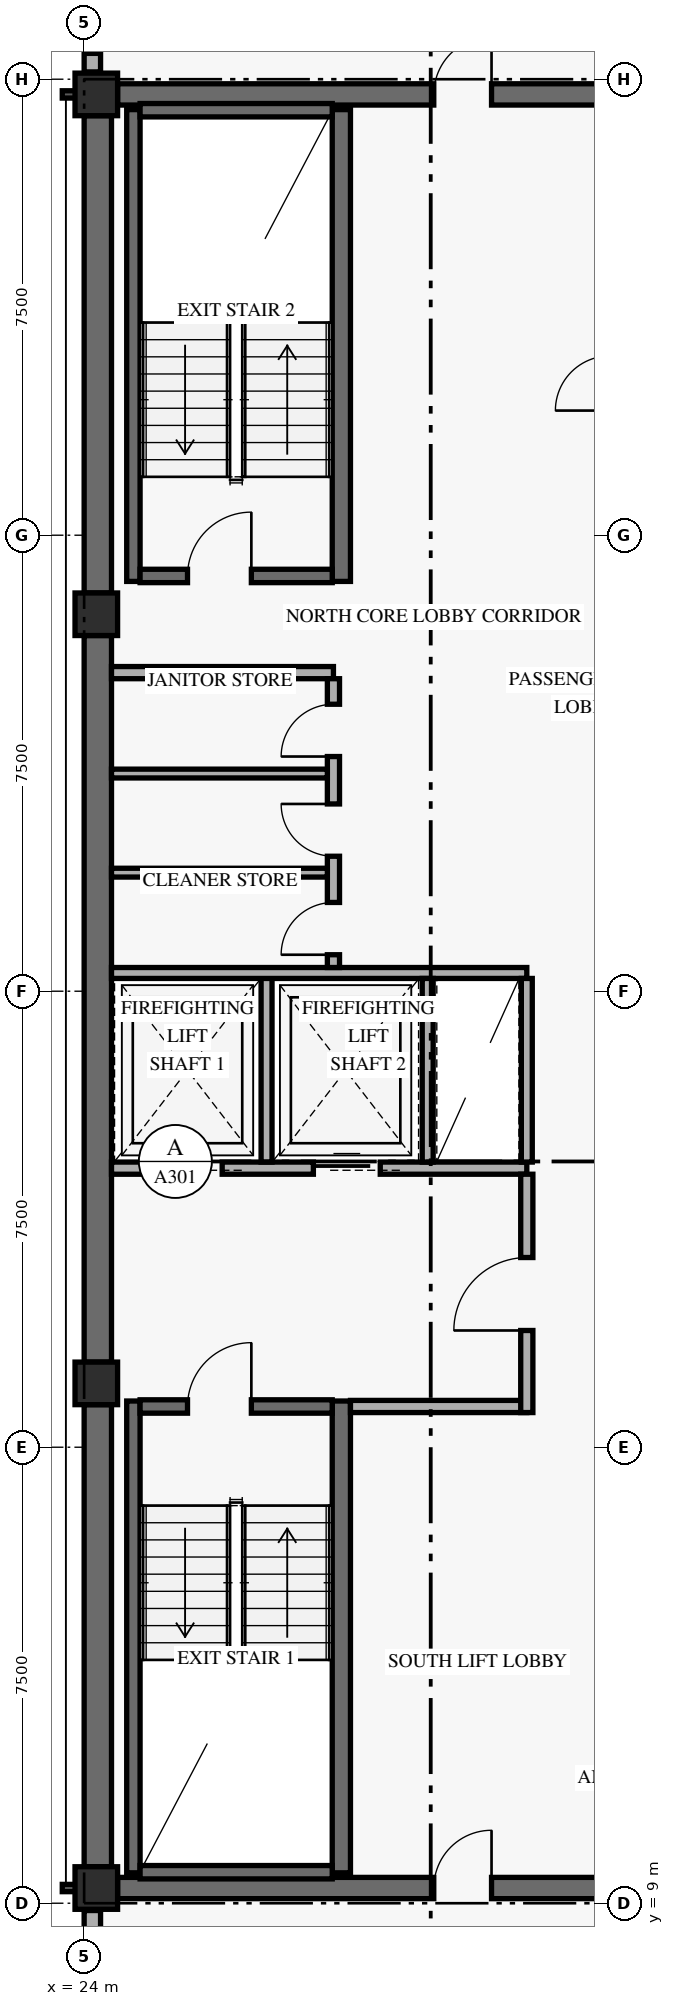
"""IFC4 building model, lengths in metres.
Left out: names, types, materials, properties, quantities, classifications, styles, units other than length and angle.
Written with IfcOpenShell. Run it as: python <this file> out.ifc"""

import sys

from ifc_helpers import new_model, si_unit, direction, frame, frame_2d, origin, origin_2d, place, context, subcontext, project, spatial, rectangle, extrude, element, fill, save


model = new_model("IFC4")
c1 = context("Model", 3, precision=1e-05, world=origin(), true_north=direction((0.0, 1.0)))
c2 = subcontext(c1, "Body", "Model", "MODEL_VIEW")
j1 = project(units=[si_unit("LENGTHUNIT", "METRE"), si_unit("PLANEANGLEUNIT", "RADIAN")], contexts=[c1])
p1 = place(None, origin())
s1 = spatial("IfcSite", under=j1, at=p1, CompositionType="ELEMENT")
p2 = place(p1, origin())
s2 = spatial("IfcBuilding", under=s1, at=p2, CompositionType="ELEMENT")
p3 = place(p2, frame((0.0, 0.0, 235.2)))
s3 = spatial("IfcBuildingStorey", under=s2, at=p3, CompositionType="ELEMENT", Elevation=235.2)
p4 = place(p3, frame((24.225, 9.6, 0.0), z_axis=(0.0, 0.0, 1.0), x_axis=(0.0, 1.0, 0.0)))
e1 = element("IfcWall", 1, at=p4, inside=s3, PredefinedType="SHEAR", context=c2, shape_type="SweptSolid", body=[
    extrude(rectangle(XDim=7.6, YDim=0.45, at=frame_2d((3.8, 0.0))), origin(), (0.0, 0.0, 1.0), 2.821),
])
p5 = place(p3, frame((24.225, 17.9, 0.0), z_axis=(0.0, 0.0, 1.0), x_axis=(0.0, 1.0, 0.0)))
e2 = element("IfcWall", 2, at=p5, inside=s3, PredefinedType="SHEAR", context=c2, shape_type="SweptSolid", body=[
    extrude(rectangle(XDim=11.95, YDim=0.45, at=frame_2d((5.975, 0.0))), origin(), (0.0, 0.0, 1.0), 2.821),
])
p6 = place(p3, frame((24.225, 30.55, 0.0), z_axis=(0.0, 0.0, 1.0), x_axis=(0.0, 1.0, 0.0)))
e3 = element("IfcWall", 3, at=p6, inside=s3, PredefinedType="SHEAR", context=c2, shape_type="SweptSolid", body=[
    extrude(rectangle(XDim=7.85, YDim=0.45, at=frame_2d((3.925, 0.0))), origin(), (0.0, 0.0, 1.0), 2.821),
])
p7 = place(p3, frame((24.55, 9.25, 0.0), z_axis=(0.0, 0.0, 1.0), x_axis=(1.0, 0.0, 0.0)))
e4 = element("IfcWall", 4, at=p7, inside=s3, PredefinedType="SHEAR", context=c2, shape_type="SweptSolid", body=[
    extrude(rectangle(XDim=10.3, YDim=0.35, at=frame_2d((5.15, 0.0))), origin(), (0.0, 0.0, 1.0), 3.36),
])
p8 = place(p7, frame((5.2, 0.0, 0.0)))
e5 = element("IfcOpeningElement", 5, at=p8, cuts=e4, PredefinedType="OPENING", context=c2, shape_type="SweptSolid", body=[
    extrude(rectangle(XDim=0.95, YDim=2.15, at=frame_2d((0.475, 1.075))), frame((0.0, 0.185, 0.0), z_axis=(0.0, -1.0, 0.0), x_axis=(1.0, 0.0, 0.0)), (0.0, 0.0, 1.0), 0.37),
])
p9 = place(p3, frame((24.55, 38.75, 0.0), z_axis=(0.0, 0.0, 1.0), x_axis=(1.0, 0.0, 0.0)))
e6 = element("IfcWall", 6, at=p9, inside=s3, PredefinedType="SHEAR", context=c2, shape_type="SweptSolid", body=[
    extrude(rectangle(XDim=10.3, YDim=0.35, at=frame_2d((5.15, 0.0))), origin(), (0.0, 0.0, 1.0), 3.36),
])
p10 = place(p9, frame((5.2, 0.0, 0.0)))
e7 = element("IfcOpeningElement", 7, at=p10, cuts=e6, PredefinedType="OPENING", context=c2, shape_type="SweptSolid", body=[
    extrude(rectangle(XDim=0.95, YDim=2.15, at=frame_2d((0.475, 1.075))), frame((0.0, 0.185, 0.0), z_axis=(0.0, -1.0, 0.0), x_axis=(1.0, 0.0, 0.0)), (0.0, 0.0, 1.0), 0.37),
])
p11 = place(p3, frame((24.81, 9.5, 0.0), z_axis=(0.0, 0.0, 1.0), x_axis=(0.0, 1.0, 0.0)))
e8 = element("IfcWall", 8, at=p11, inside=s3, PredefinedType="SHEAR", context=c2, shape_type="SweptSolid", body=[
    extrude(rectangle(XDim=7.76, YDim=0.22, at=frame_2d((3.88, 0.0))), origin(), (0.0, 0.0, 1.0), 3.36),
])
p12 = place(p3, frame((28.23, 9.5, 0.0), z_axis=(0.0, 0.0, 1.0), x_axis=(0.0, 1.0, 0.0)))
e9 = element("IfcWall", 9, at=p12, inside=s3, PredefinedType="SHEAR", context=c2, shape_type="SweptSolid", body=[
    extrude(rectangle(XDim=7.76, YDim=0.3, at=frame_2d((3.88, 0.0))), origin(), (0.0, 0.0, 1.0), 3.36),
])
p13 = place(p3, frame((24.92, 9.51, 0.0), z_axis=(0.0, 0.0, 1.0), x_axis=(1.0, 0.0, 0.0)))
e10 = element("IfcWall", 10, at=p13, inside=s3, PredefinedType="SHEAR", context=c2, shape_type="SweptSolid", body=[
    extrude(rectangle(XDim=3.16, YDim=0.22, at=frame_2d((1.58, 0.0))), origin(), (0.0, 0.0, 1.0), 3.36),
])
p14 = place(p3, frame((24.92, 17.17, 0.0), z_axis=(0.0, 0.0, 1.0), x_axis=(1.0, 0.0, 0.0)))
e11 = element("IfcWall", 11, at=p14, inside=s3, PredefinedType="SHEAR", context=c2, shape_type="SweptSolid", body=[
    extrude(rectangle(XDim=3.16, YDim=0.22, at=frame_2d((1.58, 0.0))), origin(), (0.0, 0.0, 1.0), 3.36),
])
p15 = place(p14, frame((0.78, 0.0, 0.0)))
e12 = element("IfcOpeningElement", 12, at=p15, cuts=e11, PredefinedType="OPENING", context=c2, shape_type="SweptSolid", body=[
    extrude(rectangle(XDim=1.05, YDim=2.15, at=frame_2d((0.525, 1.075))), frame((0.0, 0.12, 0.0), z_axis=(0.0, -1.0, 0.0), x_axis=(1.0, 0.0, 0.0)), (0.0, 0.0, 1.0), 0.24),
])
p16 = place(p3, frame((24.81, 30.74, 0.0), z_axis=(0.0, 0.0, 1.0), x_axis=(0.0, 1.0, 0.0)))
e13 = element("IfcWall", 13, at=p16, inside=s3, PredefinedType="SHEAR", context=c2, shape_type="SweptSolid", body=[
    extrude(rectangle(XDim=7.76, YDim=0.22, at=frame_2d((3.88, 0.0))), origin(), (0.0, 0.0, 1.0), 3.36),
])
p17 = place(p3, frame((28.23, 30.74, 0.0), z_axis=(0.0, 0.0, 1.0), x_axis=(0.0, 1.0, 0.0)))
e14 = element("IfcWall", 14, at=p17, inside=s3, PredefinedType="SHEAR", context=c2, shape_type="SweptSolid", body=[
    extrude(rectangle(XDim=7.76, YDim=0.3, at=frame_2d((3.88, 0.0))), origin(), (0.0, 0.0, 1.0), 3.36),
])
p18 = place(p3, frame((24.92, 30.83, 0.0), z_axis=(0.0, 0.0, 1.0), x_axis=(1.0, 0.0, 0.0)))
e15 = element("IfcWall", 15, at=p18, inside=s3, PredefinedType="SHEAR", context=c2, shape_type="SweptSolid", body=[
    extrude(rectangle(XDim=3.16, YDim=0.22, at=frame_2d((1.58, 0.0))), origin(), (0.0, 0.0, 1.0), 3.36),
])
p19 = place(p18, frame((0.78, 0.0, 0.0)))
e16 = element("IfcOpeningElement", 16, at=p19, cuts=e15, PredefinedType="OPENING", context=c2, shape_type="SweptSolid", body=[
    extrude(rectangle(XDim=1.05, YDim=2.15, at=frame_2d((0.525, 1.075))), frame((0.0, 0.12, 0.0), z_axis=(0.0, -1.0, 0.0), x_axis=(1.0, 0.0, 0.0)), (0.0, 0.0, 1.0), 0.24),
])
p20 = place(p3, frame((24.92, 38.49, 0.0), z_axis=(0.0, 0.0, 1.0), x_axis=(1.0, 0.0, 0.0)))
e17 = element("IfcWall", 17, at=p20, inside=s3, PredefinedType="SHEAR", context=c2, shape_type="SweptSolid", body=[
    extrude(rectangle(XDim=3.16, YDim=0.22, at=frame_2d((1.58, 0.0))), origin(), (0.0, 0.0, 1.0), 3.36),
])
for number, where, z_axis, x_axis in (
    (18, (24.2, 9.25, 0.0), (0.0, 0.0, 1.0), (1.0, 0.0, 0.0)),
    (19, (24.2, 17.55, 0.0), (0.0, 0.0, 1.0), (1.0, 0.0, 0.0)),
    (20, (24.2, 30.2, 0.0), (0.0, 0.0, 1.0), (1.0, 0.0, 0.0)),
    (21, (24.2, 38.75, 0.0), (0.0, 0.0, 1.0), (1.0, 0.0, 0.0)),
):
    element("IfcColumn", number, at=place(p3, frame(where, z_axis=z_axis, x_axis=x_axis)), inside=s3, PredefinedType="COLUMN", context=c2, shape_type="SweptSolid", body=[
        extrude(rectangle(XDim=0.7, YDim=0.7, at=origin_2d()), origin(), (0.0, 0.0, 1.0), 3.6),
    ])
p21 = place(p3, frame((24.135, 7.32, 0.0), z_axis=(0.0, 0.0, 1.0), x_axis=(0.0, 1.0, 0.0)))
e22 = element("IfcWall", 22, at=p21, inside=s3, PredefinedType="SOLIDWALL", context=c2, shape_type="SweptSolid", body=[
    extrude(rectangle(XDim=1.56, YDim=0.27, at=frame_2d((0.78, 0.0))), origin(), (0.0, 0.0, 1.0), 2.803),
])
p22 = place(p21, frame((0.305, 0.0, 0.85)))
e23 = element("IfcOpeningElement", 23, at=p22, cuts=e22, PredefinedType="OPENING", context=c2, shape_type="SweptSolid", body=[
    extrude(rectangle(XDim=0.95, YDim=1.5, at=frame_2d((0.475, 0.75))), frame((0.0, 0.145, 0.0), z_axis=(0.0, -1.0, 0.0), x_axis=(1.0, 0.0, 0.0)), (0.0, 0.0, 1.0), 0.29),
])
p23 = place(p3, frame((24.135, 39.12, 0.0), z_axis=(0.0, 0.0, 1.0), x_axis=(0.0, 1.0, 0.0)))
e24 = element("IfcWall", 24, at=p23, inside=s3, PredefinedType="SOLIDWALL", context=c2, shape_type="SweptSolid", body=[
    extrude(rectangle(XDim=1.56, YDim=0.27, at=frame_2d((0.78, 0.0))), origin(), (0.0, 0.0, 1.0), 2.803),
])
p24 = place(p23, frame((0.305, 0.0, 0.85)))
e25 = element("IfcOpeningElement", 25, at=p24, cuts=e24, PredefinedType="OPENING", context=c2, shape_type="SweptSolid", body=[
    extrude(rectangle(XDim=0.95, YDim=1.5, at=frame_2d((0.475, 0.75))), frame((0.0, 0.145, 0.0), z_axis=(0.0, -1.0, 0.0), x_axis=(1.0, 0.0, 0.0)), (0.0, 0.0, 1.0), 0.29),
])
p25 = place(p3, frame((24.45, 21.09, 0.0), z_axis=(0.0, 0.0, 1.0), x_axis=(1.0, 0.0, 0.0)))
e26 = element("IfcWall", 26, at=p25, inside=s3, PredefinedType="STANDARD", context=c2, shape_type="SweptSolid", body=[
    extrude(rectangle(XDim=6.83, YDim=0.2, at=frame_2d((3.415, 0.0))), origin(), (0.0, 0.0, 1.0), 3.36),
])
p26 = place(p25, frame((0.72, 0.0, 0.0)))
e27 = element("IfcOpeningElement", 27, at=p26, cuts=e26, PredefinedType="OPENING", context=c2, shape_type="SweptSolid", body=[
    extrude(rectangle(XDim=1.1, YDim=2.2, at=frame_2d((0.55, 1.1))), frame((0.0, 0.11, 0.0), z_axis=(0.0, -1.0, 0.0), x_axis=(1.0, 0.0, 0.0)), (0.0, 0.0, 1.0), 0.22),
])
p27 = place(p25, frame((3.32, 0.0, 0.0)))
e28 = element("IfcOpeningElement", 28, at=p27, cuts=e26, PredefinedType="OPENING", context=c2, shape_type="SweptSolid", body=[
    extrude(rectangle(XDim=1.1, YDim=2.2, at=frame_2d((0.55, 1.1))), frame((0.0, 0.11, 0.0), z_axis=(0.0, -1.0, 0.0), x_axis=(1.0, 0.0, 0.0)), (0.0, 0.0, 1.0), 0.22),
])
p28 = place(p3, frame((28.38, 17.17, 0.0), z_axis=(0.0, 0.0, 1.0), x_axis=(1.0, 0.0, 0.0)))
e29 = element("IfcWall", 29, at=p28, inside=s3, PredefinedType="STANDARD", context=c2, shape_type="SweptSolid", body=[
    extrude(rectangle(XDim=2.9, YDim=0.2, at=frame_2d((1.45, 0.0))), origin(), (0.0, 0.0, 1.0), 3.36),
])
p29 = place(p3, frame((31.28, 17.07, 0.0), z_axis=(0.0, 0.0, 1.0), x_axis=(0.0, 1.0, 0.0)))
e30 = element("IfcWall", 30, at=p29, inside=s3, PredefinedType="STANDARD", context=c2, shape_type="SweptSolid", body=[
    extrude(rectangle(XDim=3.92, YDim=0.2, at=frame_2d((1.96, 0.0))), origin(), (0.0, 0.0, 1.0), 2.803),
])
p30 = place(p29, frame((1.35, 0.0, 0.0)))
e31 = element("IfcOpeningElement", 31, at=p30, cuts=e30, PredefinedType="OPENING", context=c2, shape_type="SweptSolid", body=[
    extrude(rectangle(XDim=1.2, YDim=2.15, at=frame_2d((0.6, 1.075))), frame((0.0, 0.11, 0.0), z_axis=(0.0, -1.0, 0.0), x_axis=(1.0, 0.0, 0.0)), (0.0, 0.0, 1.0), 0.22),
])
p31 = place(p3, frame((27.0, 21.19, 0.0), z_axis=(0.0, 0.0, 1.0), x_axis=(0.0, 1.0, 0.0)))
e32 = element("IfcWall", 32, at=p31, inside=s3, PredefinedType="STANDARD", context=c2, shape_type="SweptSolid", body=[
    extrude(rectangle(XDim=3.11, YDim=0.18, at=frame_2d((1.555, 0.0))), origin(), (0.0, 0.0, 1.0), 3.36),
])
p32 = place(p3, frame((24.45, 24.3, 0.0), z_axis=(0.0, 0.0, 1.0), x_axis=(1.0, 0.0, 0.0)))
e33 = element("IfcWall", 33, at=p32, inside=s3, PredefinedType="STANDARD", context=c2, shape_type="SweptSolid", body=[
    extrude(rectangle(XDim=6.83, YDim=0.18, at=frame_2d((3.415, 0.0))), origin(), (0.0, 0.0, 1.0), 3.36),
])
for number, where, z_axis, x_axis in (
    (34, (29.65, 21.19, 0.0), (0.0, 0.0, 1.0), (0.0, 1.0, 0.0)),
    (35, (31.28, 21.19, 0.0), (0.0, 0.0, 1.0), (0.0, 1.0, 0.0)),
):
    element("IfcWall", number, at=place(p3, frame(where, z_axis=z_axis, x_axis=x_axis)), inside=s3, PredefinedType="STANDARD", context=c2, shape_type="SweptSolid", body=[
        extrude(rectangle(XDim=3.02, YDim=0.18, at=frame_2d((1.51, 0.0))), origin(), (0.0, 0.0, 1.0), 3.36),
    ])
p33 = place(p3, frame((24.45, 29.24, 0.0), z_axis=(0.0, 0.0, 1.0), x_axis=(1.0, 0.0, 0.0)))
e36 = element("IfcWall", 36, at=p33, inside=s3, PredefinedType="STANDARD", context=c2, shape_type="SweptSolid", body=[
    extrude(rectangle(XDim=3.65, YDim=0.2, at=frame_2d((1.825, 0.0))), origin(), (0.0, 0.0, 1.0), 3.36),
])
p34 = place(p3, frame((28.1, 24.39, 0.0), z_axis=(0.0, 0.0, 1.0), x_axis=(0.0, 1.0, 0.0)))
e37 = element("IfcWall", 37, at=p34, inside=s3, PredefinedType="STANDARD", context=c2, shape_type="SweptSolid", body=[
    extrude(rectangle(XDim=4.75, YDim=0.2, at=frame_2d((2.375, 0.0))), origin(), (0.0, 0.0, 1.0), 3.36),
])
p35 = place(p34, frame((0.21, 0.0, 0.0)))
e38 = element("IfcOpeningElement", 38, at=p35, cuts=e37, PredefinedType="OPENING", context=c2, shape_type="SweptSolid", body=[
    extrude(rectangle(XDim=0.86, YDim=2.1, at=frame_2d((0.43, 1.05))), frame((0.0, 0.11, 0.0), z_axis=(0.0, -1.0, 0.0), x_axis=(1.0, 0.0, 0.0)), (0.0, 0.0, 1.0), 0.22),
])
p36 = place(p34, frame((1.83, 0.0, 0.0)))
e39 = element("IfcOpeningElement", 39, at=p36, cuts=e37, PredefinedType="OPENING", context=c2, shape_type="SweptSolid", body=[
    extrude(rectangle(XDim=0.86, YDim=2.1, at=frame_2d((0.43, 1.05))), frame((0.0, 0.11, 0.0), z_axis=(0.0, -1.0, 0.0), x_axis=(1.0, 0.0, 0.0)), (0.0, 0.0, 1.0), 0.22),
])
p37 = place(p34, frame((3.47, 0.0, 0.0)))
e40 = element("IfcOpeningElement", 40, at=p37, cuts=e37, PredefinedType="OPENING", context=c2, shape_type="SweptSolid", body=[
    extrude(rectangle(XDim=0.86, YDim=2.1, at=frame_2d((0.43, 1.05))), frame((0.0, 0.11, 0.0), z_axis=(0.0, -1.0, 0.0), x_axis=(1.0, 0.0, 0.0)), (0.0, 0.0, 1.0), 0.22),
])
for number, where, z_axis, x_axis in (
    (41, (24.45, 25.95, 0.0), (0.0, 0.0, 1.0), (1.0, 0.0, 0.0)),
    (42, (24.45, 27.58, 0.0), (0.0, 0.0, 1.0), (1.0, 0.0, 0.0)),
):
    element("IfcWall", number, at=place(p3, frame(where, z_axis=z_axis, x_axis=x_axis)), inside=s3, PredefinedType="PARTITIONING", context=c2, shape_type="SweptSolid", body=[
        extrude(rectangle(XDim=3.55, YDim=0.145, at=frame_2d((1.775, 0.0))), origin(), (0.0, 0.0, 1.0), 3.36),
    ])
p38 = place(p24, origin())
e43 = element("IfcWindow", 43, at=p38, inside=s3, PartitioningType="SINGLE_PANEL", PredefinedType="WINDOW", context=c2, shape_type="SweptSolid", body=[
    extrude(rectangle(XDim=0.95, YDim=1.5, at=frame_2d((0.475, 0.75))), frame((0.0, 0.03, 0.0), z_axis=(0.0, -1.0, 0.0), x_axis=(1.0, 0.0, 0.0)), (0.0, 0.0, 1.0), 0.06),
])
fill(e25, e43)
p39 = place(p15, frame((1.05, 0.0, 0.0), z_axis=(0.0, 0.0, 1.0), x_axis=(-1.0, 0.0, 0.0)))
e44 = element("IfcDoor", 44, at=p39, inside=s3, OperationType="SINGLE_SWING_LEFT", PredefinedType="DOOR", context=c2, shape_type="SweptSolid", body=[
    extrude(rectangle(XDim=1.05, YDim=2.15, at=frame_2d((0.525, 1.075))), frame((0.0, 0.025, 0.0), z_axis=(0.0, -1.0, 0.0), x_axis=(1.0, 0.0, 0.0)), (0.0, 0.0, 1.0), 0.05),
])
fill(e12, e44)
p40 = place(p19, origin())
e45 = element("IfcDoor", 45, at=p40, inside=s3, OperationType="SINGLE_SWING_RIGHT", PredefinedType="DOOR", context=c2, shape_type="SweptSolid", body=[
    extrude(rectangle(XDim=1.05, YDim=2.15, at=frame_2d((0.525, 1.075))), frame((0.0, 0.025, 0.0), z_axis=(0.0, -1.0, 0.0), x_axis=(1.0, 0.0, 0.0)), (0.0, 0.0, 1.0), 0.05),
])
fill(e16, e45)
p41 = place(p26, origin())
e46 = element("IfcDoor", 46, at=p41, inside=s3, OperationType="SLIDING_TO_LEFT", PredefinedType="DOOR", context=c2, shape_type="SweptSolid", body=[
    extrude(rectangle(XDim=1.1, YDim=2.2, at=frame_2d((0.55, 1.1))), frame((0.0, 0.025, 0.0), z_axis=(0.0, -1.0, 0.0), x_axis=(1.0, 0.0, 0.0)), (0.0, 0.0, 1.0), 0.05),
])
fill(e27, e46)
p42 = place(p27, origin())
e47 = element("IfcDoor", 47, at=p42, inside=s3, OperationType="SLIDING_TO_LEFT", PredefinedType="DOOR", context=c2, shape_type="SweptSolid", body=[
    extrude(rectangle(XDim=1.1, YDim=2.2, at=frame_2d((0.55, 1.1))), frame((0.0, 0.025, 0.0), z_axis=(0.0, -1.0, 0.0), x_axis=(1.0, 0.0, 0.0)), (0.0, 0.0, 1.0), 0.05),
])
fill(e28, e47)
p43 = place(p30, origin())
e48 = element("IfcDoor", 48, at=p43, inside=s3, OperationType="SINGLE_SWING_LEFT", PredefinedType="DOOR", context=c2, shape_type="SweptSolid", body=[
    extrude(rectangle(XDim=1.2, YDim=2.15, at=frame_2d((0.6, 1.075))), frame((0.0, 0.025, 0.0), z_axis=(0.0, -1.0, 0.0), x_axis=(1.0, 0.0, 0.0)), (0.0, 0.0, 1.0), 0.05),
])
fill(e31, e48)
p44 = place(p35, origin())
e49 = element("IfcDoor", 49, at=p44, inside=s3, OperationType="SINGLE_SWING_LEFT", PredefinedType="DOOR", context=c2, shape_type="SweptSolid", body=[
    extrude(rectangle(XDim=0.86, YDim=2.1, at=frame_2d((0.43, 1.05))), frame((0.0, 0.025, 0.0), z_axis=(0.0, -1.0, 0.0), x_axis=(1.0, 0.0, 0.0)), (0.0, 0.0, 1.0), 0.05),
])
fill(e38, e49)
p45 = place(p36, origin())
e50 = element("IfcDoor", 50, at=p45, inside=s3, OperationType="SINGLE_SWING_RIGHT", PredefinedType="DOOR", context=c2, shape_type="SweptSolid", body=[
    extrude(rectangle(XDim=0.86, YDim=2.1, at=frame_2d((0.43, 1.05))), frame((0.0, 0.025, 0.0), z_axis=(0.0, -1.0, 0.0), x_axis=(1.0, 0.0, 0.0)), (0.0, 0.0, 1.0), 0.05),
])
fill(e39, e50)
p46 = place(p37, origin())
e51 = element("IfcDoor", 51, at=p46, inside=s3, OperationType="SINGLE_SWING_LEFT", PredefinedType="DOOR", context=c2, shape_type="SweptSolid", body=[
    extrude(rectangle(XDim=0.86, YDim=2.1, at=frame_2d((0.43, 1.05))), frame((0.0, 0.025, 0.0), z_axis=(0.0, -1.0, 0.0), x_axis=(1.0, 0.0, 0.0)), (0.0, 0.0, 1.0), 0.05),
])
fill(e40, e51)
p47 = place(p8, frame((0.95, 0.0, 0.0), z_axis=(0.0, 0.0, 1.0), x_axis=(-1.0, 0.0, 0.0)))
e52 = element("IfcDoor", 52, at=p47, inside=s3, OperationType="SINGLE_SWING_LEFT", PredefinedType="DOOR", context=c2, shape_type="SweptSolid", body=[
    extrude(rectangle(XDim=0.95, YDim=2.15, at=frame_2d((0.475, 1.075))), frame((0.0, 0.025, 0.0), z_axis=(0.0, -1.0, 0.0), x_axis=(1.0, 0.0, 0.0)), (0.0, 0.0, 1.0), 0.05),
])
fill(e5, e52)
p48 = place(p10, origin())
e53 = element("IfcDoor", 53, at=p48, inside=s3, OperationType="SINGLE_SWING_RIGHT", PredefinedType="DOOR", context=c2, shape_type="SweptSolid", body=[
    extrude(rectangle(XDim=0.95, YDim=2.15, at=frame_2d((0.475, 1.075))), frame((0.0, 0.025, 0.0), z_axis=(0.0, -1.0, 0.0), x_axis=(1.0, 0.0, 0.0)), (0.0, 0.0, 1.0), 0.05),
])
fill(e7, e53)
save(model, sys.argv[1])
